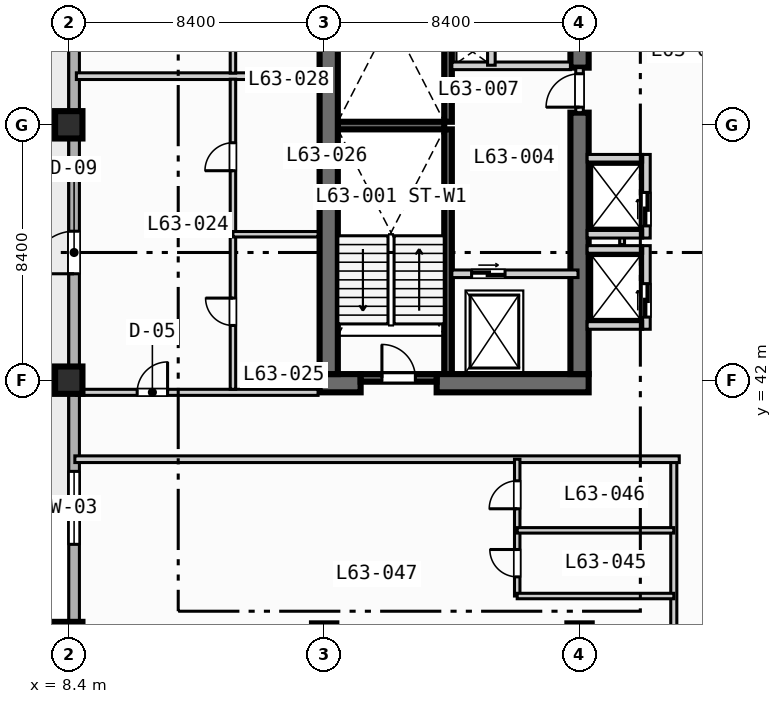
"""IFC4 building model, lengths in metres.
Left out: names, types, materials, properties, quantities, classifications, styles, units other than length and angle.
Written with IfcOpenShell. Run it as: python <this file> out.ifc"""

import sys

from ifc_helpers import new_model, si_unit, direction, frame, frame_2d, origin, origin_2d, place, context, subcontext, project, spatial, rectangle, extrude, element, fill, save


model = new_model("IFC4")
c1 = context("Model", 3, precision=1e-05, world=origin(), true_north=direction((0.0, 1.0)))
c2 = subcontext(c1, "Body", "Model", "MODEL_VIEW")
j1 = project(units=[si_unit("LENGTHUNIT", "METRE"), si_unit("PLANEANGLEUNIT", "RADIAN")], contexts=[c1])
p1 = place(None, origin())
s1 = spatial("IfcSite", under=j1, at=p1, CompositionType="ELEMENT")
p2 = place(p1, origin())
s2 = spatial("IfcBuilding", under=s1, at=p2, CompositionType="ELEMENT")
p3 = place(p2, frame((0.0, 0.0, 256.4)))
s3 = spatial("IfcBuildingStorey", under=s2, at=p3, CompositionType="ELEMENT", Elevation=256.4)
for number, where, z_axis, x_axis in (
    (1, (20.875, 42.2, 0.0), (0.0, 0.0, 1.0), (0.0, 1.0, 0.0)),
    (2, (20.875, 50.5, 0.0), (0.0, 0.0, 1.0), (0.0, 1.0, 0.0)),
):
    element("IfcWall", number, at=place(p3, frame(where, z_axis=z_axis, x_axis=x_axis)), inside=s3, PredefinedType="SOLIDWALL", context=c2, shape_type="SweptSolid", body=[
        extrude(rectangle(XDim=8.05, YDim=0.25, at=frame_2d((4.025, 0.0))), origin(), (0.0, 0.0, 1.0), 3.47),
    ])
p4 = place(p3, frame((17.25, 50.375, 0.0), z_axis=(0.0, 0.0, 1.0), x_axis=(1.0, 0.0, 0.0)))
e3 = element("IfcWall", 3, at=p4, inside=s3, PredefinedType="SOLIDWALL", context=c2, shape_type="SweptSolid", body=[
    extrude(rectangle(XDim=3.5, YDim=0.25, at=frame_2d((1.75, 0.0))), origin(), (0.0, 0.0, 1.0), 3.47),
])
p5 = place(p3, frame((16.65, 41.9, 0.0), z_axis=(0.0, 0.0, 1.0), x_axis=(1.0, 0.0, 0.0)))
e4 = element("IfcWall", 4, at=p5, inside=s3, PredefinedType="SHEAR", context=c2, shape_type="SweptSolid", body=[
    extrude(rectangle(XDim=1.35, YDim=0.6, at=frame_2d((0.675, 0.0))), origin(), (0.0, 0.0, 1.0), 3.47),
])
p6 = place(p3, frame((20.5, 41.9, 0.0), z_axis=(0.0, 0.0, 1.0), x_axis=(1.0, 0.0, 0.0)))
e5 = element("IfcWall", 5, at=p6, inside=s3, PredefinedType="SHEAR", context=c2, shape_type="SweptSolid", body=[
    extrude(rectangle(XDim=5.0, YDim=0.6, at=frame_2d((2.5, 0.0))), origin(), (0.0, 0.0, 1.0), 3.47),
])
p7 = place(p3, frame((16.95, 42.2, 0.0), z_axis=(0.0, 0.0, 1.0), x_axis=(0.0, 1.0, 0.0)))
e6 = element("IfcWall", 6, at=p7, inside=s3, PredefinedType="SHEAR", context=c2, shape_type="SweptSolid", body=[
    extrude(rectangle(XDim=16.35, YDim=0.6, at=frame_2d((8.175, 0.0))), origin(), (0.0, 0.0, 1.0), 3.47),
])
p8 = place(p3, frame((25.2, 42.2, 0.0), z_axis=(0.0, 0.0, 1.0), x_axis=(0.0, 1.0, 0.0)))
e7 = element("IfcWall", 7, at=p8, inside=s3, PredefinedType="SHEAR", context=c2, shape_type="SweptSolid", body=[
    extrude(rectangle(XDim=8.6, YDim=0.6, at=frame_2d((4.3, 0.0))), origin(), (0.0, 0.0, 1.0), 3.47),
])
p9 = place(p3, frame((25.2, 52.28, 0.0), z_axis=(0.0, 0.0, 1.0), x_axis=(0.0, 1.0, 0.0)))
e8 = element("IfcWall", 8, at=p9, inside=s3, PredefinedType="SHEAR", context=c2, shape_type="SweptSolid", body=[
    extrude(rectangle(XDim=1.27, YDim=0.6, at=frame_2d((0.635, 0.0))), origin(), (0.0, 0.0, 1.0), 3.47),
])
for number, where, z_axis, x_axis in (
    (9, (8.4, 33.6, 0.0), (0.0, 0.0, 1.0), (1.0, 0.0, 0.0)),
    (10, (8.4, 42.0, 0.0), (0.0, 0.0, 1.0), (1.0, 0.0, 0.0)),
    (11, (8.4, 50.4, 0.0), (0.0, 0.0, 1.0), (1.0, 0.0, 0.0)),
):
    element("IfcColumn", number, at=place(p3, frame(where, z_axis=z_axis, x_axis=x_axis)), inside=s3, PredefinedType="COLUMN", context=c2, shape_type="SweptSolid", body=[
        extrude(rectangle(XDim=0.9, YDim=0.9, at=origin_2d()), origin(), (0.0, 0.0, 1.0), 3.7),
    ])
for number, where, z_axis, x_axis in (
    (12, (16.8, 33.6, 0.0), (0.0, 0.0, 1.0), (1.0, 0.0, 0.0)),
    (13, (25.2, 33.6, 0.0), (0.0, 0.0, 1.0), (1.0, 0.0, 0.0)),
):
    element("IfcColumn", number, at=place(p3, frame(where, z_axis=z_axis, x_axis=x_axis)), inside=s3, PredefinedType="COLUMN", context=c2, shape_type="SweptSolid", body=[
        extrude(rectangle(XDim=0.8, YDim=0.8, at=origin_2d()), origin(), (0.0, 0.0, 1.0), 3.7),
    ])
p10 = place(p3, frame((8.575, 11.575, 0.0), z_axis=(0.0, 0.0, 1.0), x_axis=(0.0, 1.0, 0.0)))
e14 = element("IfcWall", 14, at=p10, inside=s3, PredefinedType="STANDARD", context=c2, shape_type="SweptSolid", body=[
    extrude(rectangle(XDim=60.85, YDim=0.35, at=frame_2d((30.425, 0.0))), origin(), (0.0, 0.0, 1.0), 3.47),
])
p11 = place(p10, frame((33.925, 0.0, 0.0)))
e15 = element("IfcOpeningElement", 15, at=p11, cuts=e14, PredefinedType="OPENING", context=c2, shape_type="SweptSolid", body=[
    extrude(rectangle(XDim=1.4, YDim=2.2, at=frame_2d((0.7, 1.1))), frame((0.0, 0.185, 0.0), z_axis=(0.0, -1.0, 0.0), x_axis=(1.0, 0.0, 0.0)), (0.0, 0.0, 1.0), 0.37),
])
p12 = place(p10, frame((16.925, 0.0, 0.85)))
e16 = element("IfcOpeningElement", 16, at=p12, cuts=e14, PredefinedType="OPENING", context=c2, shape_type="SweptSolid", body=[
    extrude(rectangle(XDim=1.8, YDim=1.8, at=frame_2d((0.9, 0.9))), frame((0.0, 0.185, 0.0), z_axis=(0.0, -1.0, 0.0), x_axis=(1.0, 0.0, 0.0)), (0.0, 0.0, 1.0), 0.37),
])
p13 = place(p10, frame((25.025, 0.0, 0.85)))
e17 = element("IfcOpeningElement", 17, at=p13, cuts=e14, PredefinedType="OPENING", context=c2, shape_type="SweptSolid", body=[
    extrude(rectangle(XDim=2.4, YDim=1.95, at=frame_2d((1.2, 0.975))), frame((0.0, 0.185, 0.0), z_axis=(0.0, -1.0, 0.0), x_axis=(1.0, 0.0, 0.0)), (0.0, 0.0, 1.0), 0.37),
])
p14 = place(p10, frame((41.825, 0.0, 0.85)))
e18 = element("IfcOpeningElement", 18, at=p14, cuts=e14, PredefinedType="OPENING", context=c2, shape_type="SweptSolid", body=[
    extrude(rectangle(XDim=2.4, YDim=1.95, at=frame_2d((1.2, 0.975))), frame((0.0, 0.185, 0.0), z_axis=(0.0, -1.0, 0.0), x_axis=(1.0, 0.0, 0.0)), (0.0, 0.0, 1.0), 0.37),
])
p15 = place(p3, frame((18.0, 42.075, 0.0), z_axis=(0.0, 0.0, 1.0), x_axis=(1.0, 0.0, 0.0)))
e19 = element("IfcWall", 19, at=p15, inside=s3, PredefinedType="SOLIDWALL", context=c2, shape_type="SweptSolid", body=[
    extrude(rectangle(XDim=2.5, YDim=0.25, at=frame_2d((1.25, 0.0))), origin(), (0.0, 0.0, 1.0), 3.47),
])
p16 = place(p15, frame((0.7, 0.0, 0.0)))
e20 = element("IfcOpeningElement", 20, at=p16, cuts=e19, PredefinedType="OPENING", context=c2, shape_type="SweptSolid", body=[
    extrude(rectangle(XDim=1.1, YDim=2.15, at=frame_2d((0.55, 1.075))), frame((0.0, 0.135, 0.0), z_axis=(0.0, -1.0, 0.0), x_axis=(1.0, 0.0, 0.0)), (0.0, 0.0, 1.0), 0.27),
])
p17 = place(p3, frame((21.0, 45.5, 0.0), z_axis=(0.0, 0.0, 1.0), x_axis=(1.0, 0.0, 0.0)))
e21 = element("IfcWall", 21, at=p17, inside=s3, PredefinedType="SOLIDWALL", context=c2, shape_type="SweptSolid", body=[
    extrude(rectangle(XDim=4.15, YDim=0.25, at=frame_2d((2.075, 0.0))), origin(), (0.0, 0.0, 1.0), 3.47),
])
p18 = place(p17, frame((0.65, 0.0, 0.0)))
e22 = element("IfcOpeningElement", 22, at=p18, cuts=e21, PredefinedType="OPENING", context=c2, shape_type="SweptSolid", body=[
    extrude(rectangle(XDim=1.1, YDim=2.15, at=frame_2d((0.55, 1.075))), frame((0.0, 0.135, 0.0), z_axis=(0.0, -1.0, 0.0), x_axis=(1.0, 0.0, 0.0)), (0.0, 0.0, 1.0), 0.27),
])
p19 = place(p3, frame((25.2, 50.8, 0.0), z_axis=(0.0, 0.0, 1.0), x_axis=(0.0, 1.0, 0.0)))
e23 = element("IfcWall", 23, at=p19, inside=s3, PredefinedType="SOLIDWALL", context=c2, shape_type="SweptSolid", body=[
    extrude(rectangle(XDim=1.48, YDim=0.25, at=frame_2d((0.74, 0.0))), origin(), (0.0, 0.0, 1.0), 3.47),
])
p20 = place(p19, frame((0.18, 0.0, 0.0)))
e24 = element("IfcOpeningElement", 24, at=p20, cuts=e23, PredefinedType="OPENING", context=c2, shape_type="SweptSolid", body=[
    extrude(rectangle(XDim=1.1, YDim=2.15, at=frame_2d((0.55, 1.075))), frame((0.0, 0.135, 0.0), z_axis=(0.0, -1.0, 0.0), x_axis=(1.0, 0.0, 0.0)), (0.0, 0.0, 1.0), 0.27),
])
p21 = place(p3, frame((21.0, 52.34, 0.0), z_axis=(0.0, 0.0, 1.0), x_axis=(1.0, 0.0, 0.0)))
e25 = element("IfcWall", 25, at=p21, inside=s3, PredefinedType="SOLIDWALL", context=c2, shape_type="SweptSolid", body=[
    extrude(rectangle(XDim=3.9, YDim=0.25, at=frame_2d((1.95, 0.0))), origin(), (0.0, 0.0, 1.0), 3.47),
])
p22 = place(p3, frame((22.3, 52.36, 0.0), z_axis=(0.0, 0.0, 1.0), x_axis=(0.0, 1.0, 0.0)))
e26 = element("IfcWall", 26, at=p22, inside=s3, PredefinedType="SOLIDWALL", context=c2, shape_type="SweptSolid", body=[
    extrude(rectangle(XDim=0.84, YDim=0.25, at=frame_2d((0.42, 0.0))), origin(), (0.0, 0.0, 1.0), 3.47),
])
p23 = place(p3, frame((27.4, 43.675, 0.0), z_axis=(0.0, 0.0, 1.0), x_axis=(0.0, 1.0, 0.0)))
e27 = element("IfcWall", 27, at=p23, inside=s3, PredefinedType="SOLIDWALL", context=c2, shape_type="SweptSolid", body=[
    extrude(rectangle(XDim=2.75, YDim=0.25, at=frame_2d((1.375, 0.0))), origin(), (0.0, 0.0, 1.0), 3.47),
])
p24 = place(p23, frame((0.4, 0.0, 0.0)))
e28 = element("IfcOpeningElement", 28, at=p24, cuts=e27, PredefinedType="OPENING", context=c2, shape_type="SweptSolid", body=[
    extrude(rectangle(XDim=1.1, YDim=2.15, at=frame_2d((0.55, 1.075))), frame((0.0, 0.135, 0.0), z_axis=(0.0, -1.0, 0.0), x_axis=(1.0, 0.0, 0.0)), (0.0, 0.0, 1.0), 0.27),
])
for number, where, z_axis, x_axis in (
    (29, (25.45, 43.8, 0.0), (0.0, 0.0, 1.0), (1.0, 0.0, 0.0)),
    (30, (25.45, 46.3, 0.0), (0.0, 0.0, 1.0), (1.0, 0.0, 0.0)),
):
    element("IfcWall", number, at=place(p3, frame(where, z_axis=z_axis, x_axis=x_axis)), inside=s3, PredefinedType="SOLIDWALL", context=c2, shape_type="SweptSolid", body=[
        extrude(rectangle(XDim=1.825, YDim=0.25, at=frame_2d((0.913, 0.0))), origin(), (0.0, 0.0, 1.0), 3.47),
    ])
p25 = place(p3, frame((26.6, 46.46, 0.0), z_axis=(0.0, 0.0, 1.0), x_axis=(0.0, 1.0, 0.0)))
e31 = element("IfcWall", 31, at=p25, inside=s3, PredefinedType="PARTITIONING", context=c2, shape_type="SweptSolid", body=[
    extrude(rectangle(XDim=0.88, YDim=0.16, at=frame_2d((0.44, 0.0))), origin(), (0.0, 0.0, 1.0), 3.47),
])
p26 = place(p3, frame((27.4, 46.675, 0.0), z_axis=(0.0, 0.0, 1.0), x_axis=(0.0, 1.0, 0.0)))
e32 = element("IfcWall", 32, at=p26, inside=s3, PredefinedType="SOLIDWALL", context=c2, shape_type="SweptSolid", body=[
    extrude(rectangle(XDim=2.75, YDim=0.25, at=frame_2d((1.375, 0.0))), origin(), (0.0, 0.0, 1.0), 3.47),
])
p27 = place(p26, frame((0.4, 0.0, 0.0)))
e33 = element("IfcOpeningElement", 33, at=p27, cuts=e32, PredefinedType="OPENING", context=c2, shape_type="SweptSolid", body=[
    extrude(rectangle(XDim=1.1, YDim=2.15, at=frame_2d((0.55, 1.075))), frame((0.0, 0.135, 0.0), z_axis=(0.0, -1.0, 0.0), x_axis=(1.0, 0.0, 0.0)), (0.0, 0.0, 1.0), 0.27),
])
for number, where, z_axis, x_axis in (
    (34, (25.45, 46.8, 0.0), (0.0, 0.0, 1.0), (1.0, 0.0, 0.0)),
    (35, (25.45, 49.3, 0.0), (0.0, 0.0, 1.0), (1.0, 0.0, 0.0)),
):
    element("IfcWall", number, at=place(p3, frame(where, z_axis=z_axis, x_axis=x_axis)), inside=s3, PredefinedType="SOLIDWALL", context=c2, shape_type="SweptSolid", body=[
        extrude(rectangle(XDim=1.825, YDim=0.25, at=frame_2d((0.913, 0.0))), origin(), (0.0, 0.0, 1.0), 3.47),
    ])
p28 = place(p3, frame((8.65, 41.6, 0.0), z_axis=(0.0, 0.0, 1.0), x_axis=(1.0, 0.0, 0.0)))
e36 = element("IfcWall", 36, at=p28, inside=s3, PredefinedType="PARTITIONING", context=c2, shape_type="SweptSolid", body=[
    extrude(rectangle(XDim=7.95, YDim=0.2, at=frame_2d((3.975, 0.0))), origin(), (0.0, 0.0, 1.0), 3.47),
])
p29 = place(p28, frame((2.0, 0.0, 0.0)))
e37 = element("IfcOpeningElement", 37, at=p29, cuts=e36, PredefinedType="OPENING", context=c2, shape_type="SweptSolid", body=[
    extrude(rectangle(XDim=1.0, YDim=2.15, at=frame_2d((0.5, 1.075))), frame((0.0, 0.11, 0.0), z_axis=(0.0, -1.0, 0.0), x_axis=(1.0, 0.0, 0.0)), (0.0, 0.0, 1.0), 0.22),
])
p30 = place(p3, frame((8.65, 52.0, 0.0), z_axis=(0.0, 0.0, 1.0), x_axis=(1.0, 0.0, 0.0)))
e38 = element("IfcWall", 38, at=p30, inside=s3, PredefinedType="PARTITIONING", context=c2, shape_type="SweptSolid", body=[
    extrude(rectangle(XDim=7.95, YDim=0.22, at=frame_2d((3.975, 0.0))), origin(), (0.0, 0.0, 1.0), 3.47),
])
p31 = place(p3, frame((13.8, 41.7, 0.0), z_axis=(0.0, 0.0, 1.0), x_axis=(0.0, 1.0, 0.0)))
e39 = element("IfcWall", 39, at=p31, inside=s3, PredefinedType="PLUMBINGWALL", context=c2, shape_type="SweptSolid", body=[
    extrude(rectangle(XDim=10.2, YDim=0.18, at=frame_2d((5.1, 0.0))), origin(), (0.0, 0.0, 1.0), 3.47),
])
p32 = place(p31, frame((2.1, 0.0, 0.0)))
e40 = element("IfcOpeningElement", 40, at=p32, cuts=e39, PredefinedType="OPENING", context=c2, shape_type="SweptSolid", body=[
    extrude(rectangle(XDim=0.9, YDim=2.1, at=frame_2d((0.45, 1.05))), frame((0.0, 0.1, 0.0), z_axis=(0.0, -1.0, 0.0), x_axis=(1.0, 0.0, 0.0)), (0.0, 0.0, 1.0), 0.2),
])
p33 = place(p31, frame((7.19, 0.0, 0.0)))
e41 = element("IfcOpeningElement", 41, at=p33, cuts=e39, PredefinedType="OPENING", context=c2, shape_type="SweptSolid", body=[
    extrude(rectangle(XDim=0.92, YDim=2.1, at=frame_2d((0.46, 1.05))), frame((0.0, 0.1, 0.0), z_axis=(0.0, -1.0, 0.0), x_axis=(1.0, 0.0, 0.0)), (0.0, 0.0, 1.0), 0.2),
])
p34 = place(p3, frame((13.8, 46.8, 0.0), z_axis=(0.0, 0.0, 1.0), x_axis=(1.0, 0.0, 0.0)))
e42 = element("IfcWall", 42, at=p34, inside=s3, PredefinedType="PLUMBINGWALL", context=c2, shape_type="SweptSolid", body=[
    extrude(rectangle(XDim=2.8, YDim=0.18, at=frame_2d((1.4, 0.0))), origin(), (0.0, 0.0, 1.0), 3.47),
])
p35 = place(p3, frame((13.8, 52.1, 0.0), z_axis=(0.0, 0.0, 1.0), x_axis=(0.0, 1.0, 0.0)))
e43 = element("IfcWall", 43, at=p35, inside=s3, PredefinedType="PLUMBINGWALL", context=c2, shape_type="SweptSolid", body=[
    extrude(rectangle(XDim=6.8, YDim=0.18, at=frame_2d((3.4, 0.0))), origin(), (0.0, 0.0, 1.0), 3.47),
])
p36 = place(p35, frame((1.25, 0.0, 0.0)))
e44 = element("IfcOpeningElement", 44, at=p36, cuts=e43, PredefinedType="OPENING", context=c2, shape_type="SweptSolid", body=[
    extrude(rectangle(XDim=0.9, YDim=2.1, at=frame_2d((0.45, 1.05))), frame((0.0, 0.1, 0.0), z_axis=(0.0, -1.0, 0.0), x_axis=(1.0, 0.0, 0.0)), (0.0, 0.0, 1.0), 0.2),
])
p37 = place(p35, frame((4.64, 0.0, 0.0)))
e45 = element("IfcOpeningElement", 45, at=p37, cuts=e43, PredefinedType="OPENING", context=c2, shape_type="SweptSolid", body=[
    extrude(rectangle(XDim=0.92, YDim=2.1, at=frame_2d((0.46, 1.05))), frame((0.0, 0.1, 0.0), z_axis=(0.0, -1.0, 0.0), x_axis=(1.0, 0.0, 0.0)), (0.0, 0.0, 1.0), 0.2),
])
p38 = place(p3, frame((28.3, 24.25, 0.0), z_axis=(0.0, 0.0, 1.0), x_axis=(0.0, 1.0, 0.0)))
e46 = element("IfcWall", 46, at=p38, inside=s3, PredefinedType="PARTITIONING", context=c2, shape_type="SweptSolid", body=[
    extrude(rectangle(XDim=15.15, YDim=0.2, at=frame_2d((7.575, 0.0))), origin(), (0.0, 0.0, 1.0), 3.47),
])
p39 = place(p38, frame((1.058, 0.0, 0.0)))
e47 = element("IfcOpeningElement", 47, at=p39, cuts=e46, PredefinedType="OPENING", context=c2, shape_type="SweptSolid", body=[
    extrude(rectangle(XDim=1.0, YDim=2.15, at=frame_2d((0.5, 1.075))), frame((0.0, 0.11, 0.0), z_axis=(0.0, -1.0, 0.0), x_axis=(1.0, 0.0, 0.0)), (0.0, 0.0, 1.0), 0.22),
])
p40 = place(p38, frame((8.633, 0.0, 0.0)))
e48 = element("IfcOpeningElement", 48, at=p40, cuts=e46, PredefinedType="OPENING", context=c2, shape_type="SweptSolid", body=[
    extrude(rectangle(XDim=1.0, YDim=2.15, at=frame_2d((0.5, 1.075))), frame((0.0, 0.11, 0.0), z_axis=(0.0, -1.0, 0.0), x_axis=(1.0, 0.0, 0.0)), (0.0, 0.0, 1.0), 0.22),
])
p41 = place(p3, frame((8.6, 39.4, 0.0), z_axis=(0.0, 0.0, 1.0), x_axis=(1.0, 0.0, 0.0)))
e49 = element("IfcWall", 49, at=p41, inside=s3, PredefinedType="PARTITIONING", context=c2, shape_type="SweptSolid", body=[
    extrude(rectangle(XDim=19.88, YDim=0.22, at=frame_2d((9.94, 0.0))), origin(), (0.0, 0.0, 1.0), 3.47),
])
p42 = place(p3, frame((23.15, 34.9, 0.0), z_axis=(0.0, 0.0, 1.0), x_axis=(0.0, 1.0, 0.0)))
e50 = element("IfcWall", 50, at=p42, inside=s3, PredefinedType="PLUMBINGWALL", context=c2, shape_type="SweptSolid", body=[
    extrude(rectangle(XDim=4.5, YDim=0.18, at=frame_2d((2.25, 0.0))), origin(), (0.0, 0.0, 1.0), 3.47),
])
p43 = place(p42, frame((0.63, 0.0, 0.0)))
e51 = element("IfcOpeningElement", 51, at=p43, cuts=e50, PredefinedType="OPENING", context=c2, shape_type="SweptSolid", body=[
    extrude(rectangle(XDim=0.9, YDim=2.1, at=frame_2d((0.45, 1.05))), frame((0.0, 0.1, 0.0), z_axis=(0.0, -1.0, 0.0), x_axis=(1.0, 0.0, 0.0)), (0.0, 0.0, 1.0), 0.2),
])
p44 = place(p42, frame((2.87, 0.0, 0.0)))
e52 = element("IfcOpeningElement", 52, at=p44, cuts=e50, PredefinedType="OPENING", context=c2, shape_type="SweptSolid", body=[
    extrude(rectangle(XDim=0.92, YDim=2.1, at=frame_2d((0.46, 1.05))), frame((0.0, 0.1, 0.0), z_axis=(0.0, -1.0, 0.0), x_axis=(1.0, 0.0, 0.0)), (0.0, 0.0, 1.0), 0.2),
])
for number, where, z_axis, x_axis in (
    (53, (23.15, 34.9, 0.0), (0.0, 0.0, 1.0), (1.0, 0.0, 0.0)),
    (54, (23.15, 37.06, 0.0), (0.0, 0.0, 1.0), (1.0, 0.0, 0.0)),
):
    element("IfcWall", number, at=place(p3, frame(where, z_axis=z_axis, x_axis=x_axis)), inside=s3, PredefinedType="PLUMBINGWALL", context=c2, shape_type="SweptSolid", body=[
        extrude(rectangle(XDim=5.15, YDim=0.18, at=frame_2d((2.575, 0.0))), origin(), (0.0, 0.0, 1.0), 3.47),
    ])
p45 = place(p11, origin())
e55 = element("IfcDoor", 55, at=p45, inside=s3, OperationType="SINGLE_SWING_LEFT", PredefinedType="DOOR", context=c2, shape_type="SweptSolid", body=[
    extrude(rectangle(XDim=1.4, YDim=2.2, at=frame_2d((0.7, 1.1))), frame((0.0, 0.025, 0.0), z_axis=(0.0, -1.0, 0.0), x_axis=(1.0, 0.0, 0.0)), (0.0, 0.0, 1.0), 0.05),
])
fill(e15, e55)
p46 = place(p13, origin())
e56 = element("IfcWindow", 56, at=p46, inside=s3, PartitioningType="SINGLE_PANEL", PredefinedType="WINDOW", context=c2, shape_type="SweptSolid", body=[
    extrude(rectangle(XDim=2.4, YDim=1.95, at=frame_2d((1.2, 0.975))), frame((0.0, 0.03, 0.0), z_axis=(0.0, -1.0, 0.0), x_axis=(1.0, 0.0, 0.0)), (0.0, 0.0, 1.0), 0.06),
])
fill(e17, e56)
p47 = place(p16, origin())
e57 = element("IfcDoor", 57, at=p47, inside=s3, OperationType="SINGLE_SWING_LEFT", PredefinedType="DOOR", context=c2, shape_type="SweptSolid", body=[
    extrude(rectangle(XDim=1.1, YDim=2.15, at=frame_2d((0.55, 1.075))), frame((0.0, 0.025, 0.0), z_axis=(0.0, -1.0, 0.0), x_axis=(1.0, 0.0, 0.0)), (0.0, 0.0, 1.0), 0.05),
])
fill(e20, e57)
p48 = place(p18, origin())
e58 = element("IfcDoor", 58, at=p48, inside=s3, OperationType="SLIDING_TO_LEFT", PredefinedType="DOOR", context=c2, shape_type="SweptSolid", body=[
    extrude(rectangle(XDim=1.1, YDim=2.15, at=frame_2d((0.55, 1.075))), frame((0.0, 0.025, 0.0), z_axis=(0.0, -1.0, 0.0), x_axis=(1.0, 0.0, 0.0)), (0.0, 0.0, 1.0), 0.05),
])
fill(e22, e58)
p49 = place(p20, origin())
e59 = element("IfcDoor", 59, at=p49, inside=s3, OperationType="SINGLE_SWING_LEFT", PredefinedType="DOOR", context=c2, shape_type="SweptSolid", body=[
    extrude(rectangle(XDim=1.1, YDim=2.15, at=frame_2d((0.55, 1.075))), frame((0.0, 0.025, 0.0), z_axis=(0.0, -1.0, 0.0), x_axis=(1.0, 0.0, 0.0)), (0.0, 0.0, 1.0), 0.05),
])
fill(e24, e59)
p50 = place(p24, origin())
e60 = element("IfcDoor", 60, at=p50, inside=s3, OperationType="SLIDING_TO_LEFT", PredefinedType="DOOR", context=c2, shape_type="SweptSolid", body=[
    extrude(rectangle(XDim=1.1, YDim=2.15, at=frame_2d((0.55, 1.075))), frame((0.0, 0.025, 0.0), z_axis=(0.0, -1.0, 0.0), x_axis=(1.0, 0.0, 0.0)), (0.0, 0.0, 1.0), 0.05),
])
fill(e28, e60)
p51 = place(p27, origin())
e61 = element("IfcDoor", 61, at=p51, inside=s3, OperationType="SLIDING_TO_LEFT", PredefinedType="DOOR", context=c2, shape_type="SweptSolid", body=[
    extrude(rectangle(XDim=1.1, YDim=2.15, at=frame_2d((0.55, 1.075))), frame((0.0, 0.025, 0.0), z_axis=(0.0, -1.0, 0.0), x_axis=(1.0, 0.0, 0.0)), (0.0, 0.0, 1.0), 0.05),
])
fill(e33, e61)
p52 = place(p29, origin())
e62 = element("IfcDoor", 62, at=p52, inside=s3, OperationType="SINGLE_SWING_RIGHT", PredefinedType="DOOR", context=c2, shape_type="SweptSolid", body=[
    extrude(rectangle(XDim=1.0, YDim=2.15, at=frame_2d((0.5, 1.075))), frame((0.0, 0.025, 0.0), z_axis=(0.0, -1.0, 0.0), x_axis=(1.0, 0.0, 0.0)), (0.0, 0.0, 1.0), 0.05),
])
fill(e37, e62)
p53 = place(p32, origin())
e63 = element("IfcDoor", 63, at=p53, inside=s3, OperationType="SINGLE_SWING_RIGHT", PredefinedType="DOOR", context=c2, shape_type="SweptSolid", body=[
    extrude(rectangle(XDim=0.9, YDim=2.1, at=frame_2d((0.45, 1.05))), frame((0.0, 0.025, 0.0), z_axis=(0.0, -1.0, 0.0), x_axis=(1.0, 0.0, 0.0)), (0.0, 0.0, 1.0), 0.05),
])
fill(e40, e63)
p54 = place(p33, origin())
e64 = element("IfcDoor", 64, at=p54, inside=s3, OperationType="SINGLE_SWING_LEFT", PredefinedType="DOOR", context=c2, shape_type="SweptSolid", body=[
    extrude(rectangle(XDim=0.92, YDim=2.1, at=frame_2d((0.46, 1.05))), frame((0.0, 0.025, 0.0), z_axis=(0.0, -1.0, 0.0), x_axis=(1.0, 0.0, 0.0)), (0.0, 0.0, 1.0), 0.05),
])
fill(e41, e64)
p55 = place(p43, origin())
e65 = element("IfcDoor", 65, at=p55, inside=s3, OperationType="SINGLE_SWING_RIGHT", PredefinedType="DOOR", context=c2, shape_type="SweptSolid", body=[
    extrude(rectangle(XDim=0.9, YDim=2.1, at=frame_2d((0.45, 1.05))), frame((0.0, 0.025, 0.0), z_axis=(0.0, -1.0, 0.0), x_axis=(1.0, 0.0, 0.0)), (0.0, 0.0, 1.0), 0.05),
])
fill(e51, e65)
p56 = place(p44, origin())
e66 = element("IfcDoor", 66, at=p56, inside=s3, OperationType="SINGLE_SWING_LEFT", PredefinedType="DOOR", context=c2, shape_type="SweptSolid", body=[
    extrude(rectangle(XDim=0.92, YDim=2.1, at=frame_2d((0.46, 1.05))), frame((0.0, 0.025, 0.0), z_axis=(0.0, -1.0, 0.0), x_axis=(1.0, 0.0, 0.0)), (0.0, 0.0, 1.0), 0.05),
])
fill(e52, e66)
save(model, sys.argv[1])
